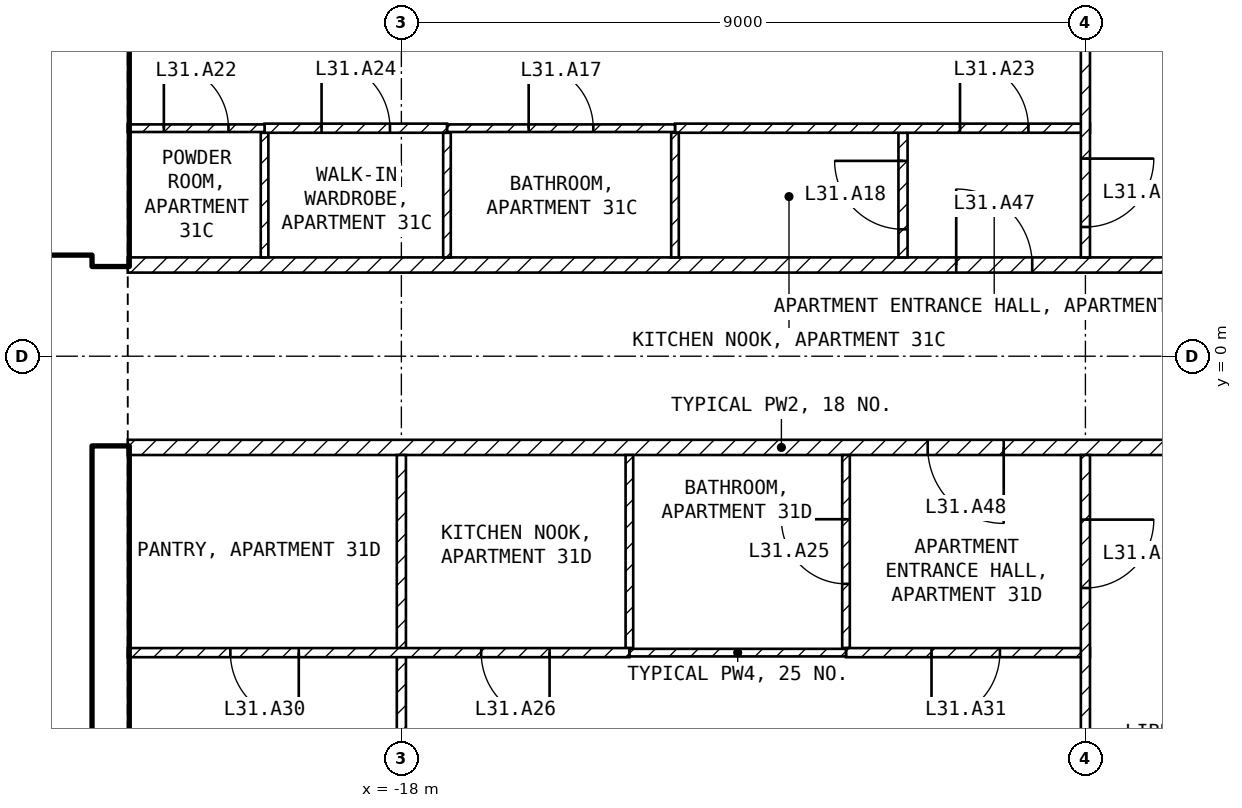
"""IFC4 building model, lengths in metres.
Left out: names, types, materials, properties, quantities, classifications, styles, units other than length and angle.
Written with IfcOpenShell. Run it as: python <this file> out.ifc"""

import sys

from ifc_helpers import new_model, si_unit, direction, frame, frame_2d, origin, place, context, subcontext, project, spatial, rectangle, extrude, element, fill, save


model = new_model("IFC4")
c1 = context("Model", 3, precision=1e-05, world=origin(), true_north=direction((0.0, 1.0)))
c2 = subcontext(c1, "Body", "Model", "MODEL_VIEW")
j1 = project(units=[si_unit("LENGTHUNIT", "METRE"), si_unit("PLANEANGLEUNIT", "RADIAN")], contexts=[c1])
p1 = place(None, origin())
s1 = spatial("IfcSite", under=j1, at=p1, CompositionType="ELEMENT")
p2 = place(p1, origin())
s2 = spatial("IfcBuilding", under=s1, at=p2, CompositionType="ELEMENT")
p3 = place(p2, frame((0.0, 0.0, 130.4)))
s3 = spatial("IfcBuildingStorey", under=s2, at=p3, CompositionType="ELEMENT", Elevation=130.4)
for number, where, z_axis, x_axis in (
    (1, (-21.825, -8.1, 0.0), (0.0, 0.0, 1.0), (0.0, 1.0, 0.0)),
    (2, (-21.825, 1.2, 0.0), (0.0, 0.0, 1.0), (0.0, 1.0, 0.0)),
):
    element("IfcWall", number, at=place(p3, frame(where, z_axis=z_axis, x_axis=x_axis)), inside=s3, PredefinedType="SHEAR", context=c2, shape_type="SweptSolid", body=[
        extrude(rectangle(XDim=6.9, YDim=0.45, at=frame_2d((3.45, 0.0))), origin(), (0.0, 0.0, 1.0), 3.25),
    ])
p4 = place(p3, frame((-33.05, 1.45, 0.0), z_axis=(0.0, 0.0, 1.0), x_axis=(1.0, 0.0, 0.0)))
e3 = element("IfcWall", 3, at=p4, inside=s3, PredefinedType="SOLIDWALL", context=c2, shape_type="SweptSolid", body=[
    extrude(rectangle(XDim=11.0, YDim=0.2, at=frame_2d((5.5, 0.0))), origin(), (0.0, 0.0, 1.0), 3.25),
])
p5 = place(p4, frame((9.25, 0.0, 0.0)))
e4 = element("IfcOpeningElement", 4, at=p5, cuts=e3, PredefinedType="OPENING", context=c2, shape_type="SweptSolid", body=[
    extrude(rectangle(XDim=1.0, YDim=2.1, at=frame_2d((0.5, 1.05))), frame((0.0, 0.11, 0.0), z_axis=(0.0, -1.0, 0.0), x_axis=(1.0, 0.0, 0.0)), (0.0, 0.0, 1.0), 0.22),
])
p6 = place(p4, frame((6.75, 0.0, 0.0)))
e5 = element("IfcOpeningElement", 5, at=p6, cuts=e3, PredefinedType="OPENING", context=c2, shape_type="SweptSolid", body=[
    extrude(rectangle(XDim=1.0, YDim=2.1, at=frame_2d((0.5, 1.05))), frame((0.0, 0.11, 0.0), z_axis=(0.0, -1.0, 0.0), x_axis=(1.0, 0.0, 0.0)), (0.0, 0.0, 1.0), 0.22),
])
p7 = place(p4, frame((1.025, 0.0, 0.0)))
e6 = element("IfcOpeningElement", 6, at=p7, cuts=e3, PredefinedType="OPENING", context=c2, shape_type="SweptSolid", body=[
    extrude(rectangle(XDim=0.9, YDim=2.1, at=frame_2d((0.45, 1.05))), frame((0.0, 0.11, 0.0), z_axis=(0.0, -1.0, 0.0), x_axis=(1.0, 0.0, 0.0)), (0.0, 0.0, 1.0), 0.22),
])
p8 = place(p3, frame((-21.6, 1.2, 0.0), z_axis=(0.0, 0.0, 1.0), x_axis=(1.0, 0.0, 0.0)))
e7 = element("IfcWall", 7, at=p8, inside=s3, PredefinedType="PARTITIONING", context=c2, shape_type="SweptSolid", body=[
    extrude(rectangle(XDim=17.2, YDim=0.2, at=frame_2d((8.6, 0.0))), origin(), (0.0, 0.0, 1.0), 3.25),
])
p9 = place(p8, frame((10.9, 0.0, 0.0)))
e8 = element("IfcOpeningElement", 8, at=p9, cuts=e7, PredefinedType="OPENING", context=c2, shape_type="SweptSolid", body=[
    extrude(rectangle(XDim=1.0, YDim=2.1, at=frame_2d((0.5, 1.05))), frame((0.0, 0.11, 0.0), z_axis=(0.0, -1.0, 0.0), x_axis=(1.0, 0.0, 0.0)), (0.0, 0.0, 1.0), 0.22),
])
p10 = place(p3, frame((-4.4, -1.2, 0.0), z_axis=(0.0, 0.0, 1.0), x_axis=(-1.0, 0.0, 0.0)))
e9 = element("IfcWall", 9, at=p10, inside=s3, PredefinedType="PARTITIONING", context=c2, shape_type="SweptSolid", body=[
    extrude(rectangle(XDim=17.2, YDim=0.2, at=frame_2d((8.6, 0.0))), origin(), (0.0, 0.0, 1.0), 3.25),
])
p11 = place(p10, frame((5.675, 0.0, 0.0)))
e10 = element("IfcOpeningElement", 10, at=p11, cuts=e9, PredefinedType="OPENING", context=c2, shape_type="SweptSolid", body=[
    extrude(rectangle(XDim=1.0, YDim=2.1, at=frame_2d((0.5, 1.05))), frame((0.0, 0.11, 0.0), z_axis=(0.0, -1.0, 0.0), x_axis=(1.0, 0.0, 0.0)), (0.0, 0.0, 1.0), 0.22),
])
p12 = place(p3, frame((-11.4, 1.3, 0.0), z_axis=(0.0, 0.0, 1.0), x_axis=(0.0, 1.0, 0.0)))
e11 = element("IfcWall", 11, at=p12, inside=s3, PredefinedType="PARTITIONING", context=c2, shape_type="SweptSolid", body=[
    extrude(rectangle(XDim=1.64, YDim=0.12, at=frame_2d((0.82, 0.0))), origin(), (0.0, 0.0, 1.0), 3.25),
])
p13 = place(p12, frame((0.37, 0.0, 0.0)))
e12 = element("IfcOpeningElement", 12, at=p13, cuts=e11, PredefinedType="OPENING", context=c2, shape_type="SweptSolid", body=[
    extrude(rectangle(XDim=0.9, YDim=2.1, at=frame_2d((0.45, 1.05))), frame((0.0, 0.07, 0.0), z_axis=(0.0, -1.0, 0.0), x_axis=(1.0, 0.0, 0.0)), (0.0, 0.0, 1.0), 0.14),
])
p14 = place(p3, frame((-14.4, 3.0, 0.0), z_axis=(0.0, 0.0, 1.0), x_axis=(1.0, 0.0, 0.0)))
e13 = element("IfcWall", 13, at=p14, inside=s3, PredefinedType="PARTITIONING", context=c2, shape_type="SweptSolid", body=[
    extrude(rectangle(XDim=5.46, YDim=0.12, at=frame_2d((2.73, 0.0))), origin(), (0.0, 0.0, 1.0), 3.25),
])
p15 = place(p14, frame((3.75, 0.0, 0.0)))
e14 = element("IfcOpeningElement", 14, at=p15, cuts=e13, PredefinedType="OPENING", context=c2, shape_type="SweptSolid", body=[
    extrude(rectangle(XDim=0.9, YDim=2.1, at=frame_2d((0.45, 1.05))), frame((0.0, 0.07, 0.0), z_axis=(0.0, -1.0, 0.0), x_axis=(1.0, 0.0, 0.0)), (0.0, 0.0, 1.0), 0.14),
])
p16 = place(p3, frame((-9.0, 8.92, 0.0), z_axis=(0.0, 0.0, 1.0), x_axis=(0.0, -1.0, 0.0)))
e15 = element("IfcWall", 15, at=p16, inside=s3, PredefinedType="PARTITIONING", context=c2, shape_type="SweptSolid", body=[
    extrude(rectangle(XDim=7.62, YDim=0.12, at=frame_2d((3.81, 0.0))), origin(), (0.0, 0.0, 1.0), 3.25),
])
p17 = place(p16, frame((6.32, 0.0, 0.0)))
e16 = element("IfcOpeningElement", 16, at=p17, cuts=e15, PredefinedType="OPENING", context=c2, shape_type="SweptSolid", body=[
    extrude(rectangle(XDim=0.9, YDim=2.1, at=frame_2d((0.45, 1.05))), frame((0.0, 0.07, 0.0), z_axis=(0.0, -1.0, 0.0), x_axis=(1.0, 0.0, 0.0)), (0.0, 0.0, 1.0), 0.14),
])
for number, where, z_axis, x_axis in (
    (17, (-14.4, 1.3, 0.0), (0.0, 0.0, 1.0), (0.0, 1.0, 0.0)),
    (18, (-17.4, 1.3, 0.0), (0.0, 0.0, 1.0), (0.0, 1.0, 0.0)),
):
    element("IfcWall", number, at=place(p3, frame(where, z_axis=z_axis, x_axis=x_axis)), inside=s3, PredefinedType="PARTITIONING", context=c2, shape_type="SweptSolid", body=[
        extrude(rectangle(XDim=1.64, YDim=0.1, at=frame_2d((0.82, 0.0))), origin(), (0.0, 0.0, 1.0), 3.25),
    ])
p18 = place(p3, frame((-17.4, 3.0, 0.0), z_axis=(0.0, 0.0, 1.0), x_axis=(1.0, 0.0, 0.0)))
e19 = element("IfcWall", 19, at=p18, inside=s3, PredefinedType="PARTITIONING", context=c2, shape_type="SweptSolid", body=[
    extrude(rectangle(XDim=3.0, YDim=0.1, at=frame_2d((1.5, 0.0))), origin(), (0.0, 0.0, 1.0), 3.25),
])
p19 = place(p18, frame((1.075, 0.0, 0.0)))
e20 = element("IfcOpeningElement", 20, at=p19, cuts=e19, PredefinedType="OPENING", context=c2, shape_type="SweptSolid", body=[
    extrude(rectangle(XDim=0.85, YDim=2.1, at=frame_2d((0.425, 1.05))), frame((0.0, 0.06, 0.0), z_axis=(0.0, -1.0, 0.0), x_axis=(1.0, 0.0, 0.0)), (0.0, 0.0, 1.0), 0.12),
])
p20 = place(p3, frame((-19.8, 1.3, 0.0), z_axis=(0.0, 0.0, 1.0), x_axis=(0.0, 1.0, 0.0)))
e21 = element("IfcWall", 21, at=p20, inside=s3, PredefinedType="PARTITIONING", context=c2, shape_type="SweptSolid", body=[
    extrude(rectangle(XDim=1.64, YDim=0.1, at=frame_2d((0.82, 0.0))), origin(), (0.0, 0.0, 1.0), 3.25),
])
p21 = place(p3, frame((-19.8, 3.0, 0.0), z_axis=(0.0, 0.0, 1.0), x_axis=(1.0, 0.0, 0.0)))
e22 = element("IfcWall", 22, at=p21, inside=s3, PredefinedType="PARTITIONING", context=c2, shape_type="SweptSolid", body=[
    extrude(rectangle(XDim=2.4, YDim=0.12, at=frame_2d((1.2, 0.0))), origin(), (0.0, 0.0, 1.0), 3.25),
])
p22 = place(p21, frame((0.75, 0.0, 0.0)))
e23 = element("IfcOpeningElement", 23, at=p22, cuts=e22, PredefinedType="OPENING", context=c2, shape_type="SweptSolid", body=[
    extrude(rectangle(XDim=0.9, YDim=2.1, at=frame_2d((0.45, 1.05))), frame((0.0, 0.07, 0.0), z_axis=(0.0, -1.0, 0.0), x_axis=(1.0, 0.0, 0.0)), (0.0, 0.0, 1.0), 0.14),
])
p23 = place(p3, frame((-21.6, 3.0, 0.0), z_axis=(0.0, 0.0, 1.0), x_axis=(1.0, 0.0, 0.0)))
e24 = element("IfcWall", 24, at=p23, inside=s3, PredefinedType="PARTITIONING", context=c2, shape_type="SweptSolid", body=[
    extrude(rectangle(XDim=1.8, YDim=0.1, at=frame_2d((0.9, 0.0))), origin(), (0.0, 0.0, 1.0), 3.25),
])
p24 = place(p23, frame((0.475, 0.0, 0.0)))
e25 = element("IfcOpeningElement", 25, at=p24, cuts=e24, PredefinedType="OPENING", context=c2, shape_type="SweptSolid", body=[
    extrude(rectangle(XDim=0.85, YDim=2.1, at=frame_2d((0.425, 1.05))), frame((0.0, 0.06, 0.0), z_axis=(0.0, -1.0, 0.0), x_axis=(1.0, 0.0, 0.0)), (0.0, 0.0, 1.0), 0.12),
])
p25 = place(p3, frame((-12.15, -3.84, 0.0), z_axis=(0.0, 0.0, 1.0), x_axis=(0.0, 1.0, 0.0)))
e26 = element("IfcWall", 26, at=p25, inside=s3, PredefinedType="PARTITIONING", context=c2, shape_type="SweptSolid", body=[
    extrude(rectangle(XDim=2.54, YDim=0.1, at=frame_2d((1.27, 0.0))), origin(), (0.0, 0.0, 1.0), 3.25),
])
p26 = place(p25, frame((0.845, 0.0, 0.0)))
e27 = element("IfcOpeningElement", 27, at=p26, cuts=e26, PredefinedType="OPENING", context=c2, shape_type="SweptSolid", body=[
    extrude(rectangle(XDim=0.85, YDim=2.1, at=frame_2d((0.425, 1.05))), frame((0.0, 0.06, 0.0), z_axis=(0.0, -1.0, 0.0), x_axis=(1.0, 0.0, 0.0)), (0.0, 0.0, 1.0), 0.12),
])
p27 = place(p3, frame((-8.94, -3.9, 0.0), z_axis=(0.0, 0.0, 1.0), x_axis=(-1.0, 0.0, 0.0)))
e28 = element("IfcWall", 28, at=p27, inside=s3, PredefinedType="PARTITIONING", context=c2, shape_type="SweptSolid", body=[
    extrude(rectangle(XDim=3.21, YDim=0.12, at=frame_2d((1.605, 0.0))), origin(), (0.0, 0.0, 1.0), 3.25),
])
p28 = place(p27, frame((1.185, 0.0, 0.0)))
e29 = element("IfcOpeningElement", 29, at=p28, cuts=e28, PredefinedType="OPENING", context=c2, shape_type="SweptSolid", body=[
    extrude(rectangle(XDim=0.9, YDim=2.1, at=frame_2d((0.45, 1.05))), frame((0.0, 0.07, 0.0), z_axis=(0.0, -1.0, 0.0), x_axis=(1.0, 0.0, 0.0)), (0.0, 0.0, 1.0), 0.14),
])
p29 = place(p3, frame((-9.0, -1.3, 0.0), z_axis=(0.0, 0.0, 1.0), x_axis=(0.0, -1.0, 0.0)))
e30 = element("IfcWall", 30, at=p29, inside=s3, PredefinedType="PARTITIONING", context=c2, shape_type="SweptSolid", body=[
    extrude(rectangle(XDim=7.62, YDim=0.12, at=frame_2d((3.81, 0.0))), origin(), (0.0, 0.0, 1.0), 3.25),
])
p30 = place(p29, frame((0.85, 0.0, 0.0)))
e31 = element("IfcOpeningElement", 31, at=p30, cuts=e30, PredefinedType="OPENING", context=c2, shape_type="SweptSolid", body=[
    extrude(rectangle(XDim=0.9, YDim=2.1, at=frame_2d((0.45, 1.05))), frame((0.0, 0.07, 0.0), z_axis=(0.0, -1.0, 0.0), x_axis=(1.0, 0.0, 0.0)), (0.0, 0.0, 1.0), 0.14),
])
p31 = place(p3, frame((-15.0, -3.84, 0.0), z_axis=(0.0, 0.0, 1.0), x_axis=(0.0, 1.0, 0.0)))
e32 = element("IfcWall", 32, at=p31, inside=s3, PredefinedType="PARTITIONING", context=c2, shape_type="SweptSolid", body=[
    extrude(rectangle(XDim=2.54, YDim=0.1, at=frame_2d((1.27, 0.0))), origin(), (0.0, 0.0, 1.0), 3.25),
])
p32 = place(p3, frame((-12.15, -3.9, 0.0), z_axis=(0.0, 0.0, 1.0), x_axis=(-1.0, 0.0, 0.0)))
e33 = element("IfcWall", 33, at=p32, inside=s3, PredefinedType="PARTITIONING", context=c2, shape_type="SweptSolid", body=[
    extrude(rectangle(XDim=2.85, YDim=0.1, at=frame_2d((1.425, 0.0))), origin(), (0.0, 0.0, 1.0), 3.25),
])
p33 = place(p3, frame((-18.0, -8.92, 0.0), z_axis=(0.0, 0.0, 1.0), x_axis=(0.0, 1.0, 0.0)))
e34 = element("IfcWall", 34, at=p33, inside=s3, PredefinedType="PARTITIONING", context=c2, shape_type="SweptSolid", body=[
    extrude(rectangle(XDim=7.62, YDim=0.12, at=frame_2d((3.81, 0.0))), origin(), (0.0, 0.0, 1.0), 2.414),
])
p34 = place(p33, frame((2.62, 0.0, 0.0)))
e35 = element("IfcOpeningElement", 35, at=p34, cuts=e34, PredefinedType="OPENING", context=c2, shape_type="SweptSolid", body=[
    extrude(rectangle(XDim=0.9, YDim=2.1, at=frame_2d((0.45, 1.05))), frame((0.0, 0.07, 0.0), z_axis=(0.0, -1.0, 0.0), x_axis=(1.0, 0.0, 0.0)), (0.0, 0.0, 1.0), 0.14),
])
p35 = place(p3, frame((-15.0, -3.9, 0.0), z_axis=(0.0, 0.0, 1.0), x_axis=(-1.0, 0.0, 0.0)))
e36 = element("IfcWall", 36, at=p35, inside=s3, PredefinedType="PARTITIONING", context=c2, shape_type="SweptSolid", body=[
    extrude(rectangle(XDim=6.6, YDim=0.12, at=frame_2d((3.3, 0.0))), origin(), (0.0, 0.0, 1.0), 3.25),
])
p36 = place(p35, frame((1.05, 0.0, 0.0)))
e37 = element("IfcOpeningElement", 37, at=p36, cuts=e36, PredefinedType="OPENING", context=c2, shape_type="SweptSolid", body=[
    extrude(rectangle(XDim=0.9, YDim=2.1, at=frame_2d((0.45, 1.05))), frame((0.0, 0.07, 0.0), z_axis=(0.0, -1.0, 0.0), x_axis=(1.0, 0.0, 0.0)), (0.0, 0.0, 1.0), 0.14),
])
p37 = place(p35, frame((4.35, 0.0, 0.0)))
e38 = element("IfcOpeningElement", 38, at=p37, cuts=e36, PredefinedType="OPENING", context=c2, shape_type="SweptSolid", body=[
    extrude(rectangle(XDim=0.9, YDim=2.1, at=frame_2d((0.45, 1.05))), frame((0.0, 0.07, 0.0), z_axis=(0.0, -1.0, 0.0), x_axis=(1.0, 0.0, 0.0)), (0.0, 0.0, 1.0), 0.14),
])
p38 = place(p19, origin())
e39 = element("IfcDoor", 39, at=p38, inside=s3, OperationType="SINGLE_SWING_LEFT", PredefinedType="DOOR", context=c2, shape_type="SweptSolid", body=[
    extrude(rectangle(XDim=0.85, YDim=2.1, at=frame_2d((0.425, 1.05))), frame((0.0, 0.025, 0.0), z_axis=(0.0, -1.0, 0.0), x_axis=(1.0, 0.0, 0.0)), (0.0, 0.0, 1.0), 0.05),
])
fill(e20, e39)
p39 = place(p13, origin())
e40 = element("IfcDoor", 40, at=p39, inside=s3, OperationType="SINGLE_SWING_RIGHT", PredefinedType="DOOR", context=c2, shape_type="SweptSolid", body=[
    extrude(rectangle(XDim=0.9, YDim=2.1, at=frame_2d((0.45, 1.05))), frame((0.0, 0.025, 0.0), z_axis=(0.0, -1.0, 0.0), x_axis=(1.0, 0.0, 0.0)), (0.0, 0.0, 1.0), 0.05),
])
fill(e12, e40)
p40 = place(p17, origin())
e41 = element("IfcDoor", 41, at=p40, inside=s3, OperationType="SINGLE_SWING_LEFT", PredefinedType="DOOR", context=c2, shape_type="SweptSolid", body=[
    extrude(rectangle(XDim=0.9, YDim=2.1, at=frame_2d((0.45, 1.05))), frame((0.0, 0.025, 0.0), z_axis=(0.0, -1.0, 0.0), x_axis=(1.0, 0.0, 0.0)), (0.0, 0.0, 1.0), 0.05),
])
fill(e16, e41)
p41 = place(p24, origin())
e42 = element("IfcDoor", 42, at=p41, inside=s3, OperationType="SINGLE_SWING_LEFT", PredefinedType="DOOR", context=c2, shape_type="SweptSolid", body=[
    extrude(rectangle(XDim=0.85, YDim=2.1, at=frame_2d((0.425, 1.05))), frame((0.0, 0.025, 0.0), z_axis=(0.0, -1.0, 0.0), x_axis=(1.0, 0.0, 0.0)), (0.0, 0.0, 1.0), 0.05),
])
fill(e25, e42)
p42 = place(p15, origin())
e43 = element("IfcDoor", 43, at=p42, inside=s3, OperationType="SINGLE_SWING_LEFT", PredefinedType="DOOR", context=c2, shape_type="SweptSolid", body=[
    extrude(rectangle(XDim=0.9, YDim=2.1, at=frame_2d((0.45, 1.05))), frame((0.0, 0.025, 0.0), z_axis=(0.0, -1.0, 0.0), x_axis=(1.0, 0.0, 0.0)), (0.0, 0.0, 1.0), 0.05),
])
fill(e14, e43)
p43 = place(p22, origin())
e44 = element("IfcDoor", 44, at=p43, inside=s3, OperationType="SINGLE_SWING_LEFT", PredefinedType="DOOR", context=c2, shape_type="SweptSolid", body=[
    extrude(rectangle(XDim=0.9, YDim=2.1, at=frame_2d((0.45, 1.05))), frame((0.0, 0.025, 0.0), z_axis=(0.0, -1.0, 0.0), x_axis=(1.0, 0.0, 0.0)), (0.0, 0.0, 1.0), 0.05),
])
fill(e23, e44)
p44 = place(p26, origin())
e45 = element("IfcDoor", 45, at=p44, inside=s3, OperationType="SINGLE_SWING_RIGHT", PredefinedType="DOOR", context=c2, shape_type="SweptSolid", body=[
    extrude(rectangle(XDim=0.85, YDim=2.1, at=frame_2d((0.425, 1.05))), frame((0.0, 0.025, 0.0), z_axis=(0.0, -1.0, 0.0), x_axis=(1.0, 0.0, 0.0)), (0.0, 0.0, 1.0), 0.05),
])
fill(e27, e45)
p45 = place(p36, origin())
e46 = element("IfcDoor", 46, at=p45, inside=s3, OperationType="SINGLE_SWING_LEFT", PredefinedType="DOOR", context=c2, shape_type="SweptSolid", body=[
    extrude(rectangle(XDim=0.9, YDim=2.1, at=frame_2d((0.45, 1.05))), frame((0.0, 0.025, 0.0), z_axis=(0.0, -1.0, 0.0), x_axis=(1.0, 0.0, 0.0)), (0.0, 0.0, 1.0), 0.05),
])
fill(e37, e46)
p46 = place(p30, origin())
e47 = element("IfcDoor", 47, at=p46, inside=s3, OperationType="SINGLE_SWING_LEFT", PredefinedType="DOOR", context=c2, shape_type="SweptSolid", body=[
    extrude(rectangle(XDim=0.9, YDim=2.1, at=frame_2d((0.45, 1.05))), frame((0.0, 0.025, 0.0), z_axis=(0.0, -1.0, 0.0), x_axis=(1.0, 0.0, 0.0)), (0.0, 0.0, 1.0), 0.05),
])
fill(e31, e47)
p47 = place(p37, origin())
e48 = element("IfcDoor", 48, at=p47, inside=s3, OperationType="SINGLE_SWING_LEFT", PredefinedType="DOOR", context=c2, shape_type="SweptSolid", body=[
    extrude(rectangle(XDim=0.9, YDim=2.1, at=frame_2d((0.45, 1.05))), frame((0.0, 0.025, 0.0), z_axis=(0.0, -1.0, 0.0), x_axis=(1.0, 0.0, 0.0)), (0.0, 0.0, 1.0), 0.05),
])
fill(e38, e48)
p48 = place(p28, origin())
e49 = element("IfcDoor", 49, at=p48, inside=s3, OperationType="SINGLE_SWING_RIGHT", PredefinedType="DOOR", context=c2, shape_type="SweptSolid", body=[
    extrude(rectangle(XDim=0.9, YDim=2.1, at=frame_2d((0.45, 1.05))), frame((0.0, 0.025, 0.0), z_axis=(0.0, -1.0, 0.0), x_axis=(1.0, 0.0, 0.0)), (0.0, 0.0, 1.0), 0.05),
])
fill(e29, e49)
p49 = place(p9, origin())
e50 = element("IfcDoor", 50, at=p49, inside=s3, OperationType="SINGLE_SWING_LEFT", PredefinedType="DOOR", context=c2, shape_type="SweptSolid", body=[
    extrude(rectangle(XDim=1.0, YDim=2.1, at=frame_2d((0.5, 1.05))), frame((0.0, 0.025, 0.0), z_axis=(0.0, -1.0, 0.0), x_axis=(1.0, 0.0, 0.0)), (0.0, 0.0, 1.0), 0.05),
])
fill(e8, e50)
p50 = place(p11, origin())
e51 = element("IfcDoor", 51, at=p50, inside=s3, OperationType="SINGLE_SWING_LEFT", PredefinedType="DOOR", context=c2, shape_type="SweptSolid", body=[
    extrude(rectangle(XDim=1.0, YDim=2.1, at=frame_2d((0.5, 1.05))), frame((0.0, 0.025, 0.0), z_axis=(0.0, -1.0, 0.0), x_axis=(1.0, 0.0, 0.0)), (0.0, 0.0, 1.0), 0.05),
])
fill(e10, e51)
save(model, sys.argv[1])
